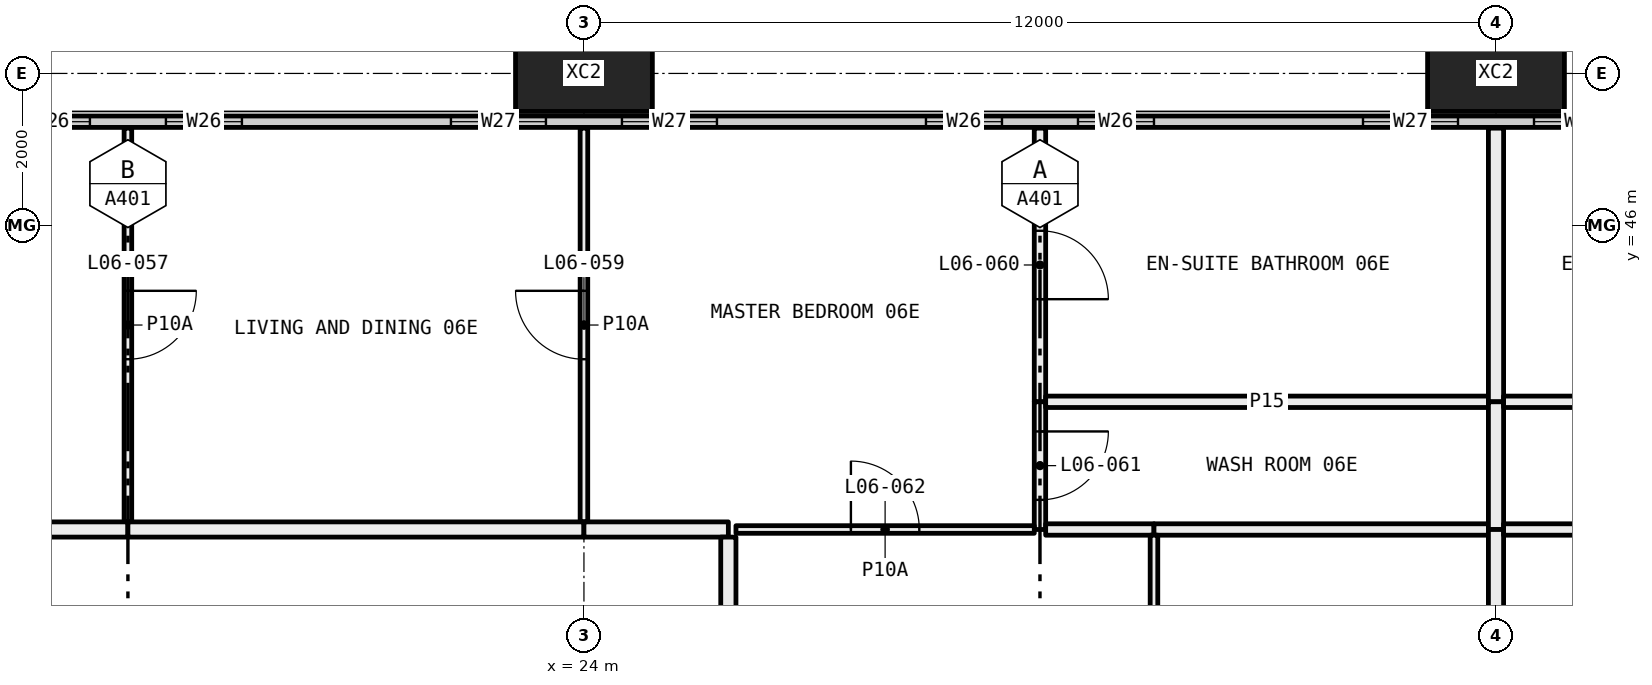
"""IFC4 building model, lengths in metres.
Left out: names, types, materials, properties, quantities, classifications, styles, units other than length and angle.
Written with IfcOpenShell. Run it as: python <this file> out.ifc"""

import sys

from ifc_helpers import new_model, si_unit, direction, frame, frame_2d, origin, origin_2d, place, context, subcontext, project, spatial, rectangle, hollow_rectangle, extrude, element, fill, save


model = new_model("IFC4")
c1 = context("Model", 3, precision=1e-05, world=origin(), true_north=direction((0.0, 1.0)))
c2 = subcontext(c1, "Body", "Model", "MODEL_VIEW")
j1 = project(units=[si_unit("LENGTHUNIT", "METRE"), si_unit("PLANEANGLEUNIT", "RADIAN")], contexts=[c1])
p1 = place(None, origin())
s1 = spatial("IfcSite", under=j1, at=p1, CompositionType="ELEMENT")
p2 = place(p1, origin())
s2 = spatial("IfcBuilding", under=s1, at=p2, CompositionType="ELEMENT")
p3 = place(p2, frame((0.0, 0.0, 33.45)))
s3 = spatial("IfcBuildingStorey", under=s2, at=p3, CompositionType="ELEMENT", Elevation=33.45)
for number, where, z_axis, x_axis in (
    (1, (24.0, 48.0, -0.4), (0.0, 0.0, 1.0), (1.0, 0.0, 0.0)),
    (2, (36.0, 48.0, -0.4), (0.0, 0.0, 1.0), (1.0, 0.0, 0.0)),
):
    element("IfcColumn", number, at=place(p3, frame(where, z_axis=z_axis, x_axis=x_axis)), inside=s3, PredefinedType="COLUMN", context=c2, shape_type="SweptSolid", body=[
        extrude(hollow_rectangle(XDim=1.8, YDim=1.0, WallThickness=0.07, at=origin_2d()), origin(), (0.0, 0.0, 1.0), 3.45),
    ])
p4 = place(p3, frame((6.56, 47.365, 0.0), z_axis=(0.0, 0.0, 1.0), x_axis=(1.0, 0.0, 0.0)))
e3 = element("IfcWall", 3, at=p4, inside=s3, PredefinedType="ELEMENTEDWALL", context=c2, shape_type="SweptSolid", body=[
    extrude(rectangle(XDim=58.88, YDim=0.15, at=frame_2d((29.44, 0.0))), origin(), (0.0, 0.0, 1.0), 3.05),
])
p5 = place(p4, frame((0.44, 0.0, 0.45)))
e4 = element("IfcOpeningElement", 4, at=p5, cuts=e3, PredefinedType="OPENING", context=c2, shape_type="SweptSolid", body=[
    extrude(rectangle(XDim=4.5, YDim=2.55, at=frame_2d((2.25, 1.275))), frame((0.0, 0.085, 0.0), z_axis=(0.0, -1.0, 0.0), x_axis=(1.0, 0.0, 0.0)), (0.0, 0.0, 1.0), 0.17),
])
p6 = place(p4, frame((5.94, 0.0, 0.45)))
e5 = element("IfcOpeningElement", 5, at=p6, cuts=e3, PredefinedType="OPENING", context=c2, shape_type="SweptSolid", body=[
    extrude(rectangle(XDim=1.25, YDim=2.55, at=frame_2d((0.625, 1.275))), frame((0.0, 0.085, 0.0), z_axis=(0.0, -1.0, 0.0), x_axis=(1.0, 0.0, 0.0)), (0.0, 0.0, 1.0), 0.17),
])
p7 = place(p4, frame((9.94, 0.0, 0.45)))
e6 = element("IfcOpeningElement", 6, at=p7, cuts=e3, PredefinedType="OPENING", context=c2, shape_type="SweptSolid", body=[
    extrude(rectangle(XDim=1.0, YDim=2.55, at=frame_2d((0.5, 1.275))), frame((0.0, 0.085, 0.0), z_axis=(0.0, -1.0, 0.0), x_axis=(1.0, 0.0, 0.0)), (0.0, 0.0, 1.0), 0.17),
])
p8 = place(p4, frame((11.94, 0.0, 0.45)))
e7 = element("IfcOpeningElement", 7, at=p8, cuts=e3, PredefinedType="OPENING", context=c2, shape_type="SweptSolid", body=[
    extrude(rectangle(XDim=1.0, YDim=2.55, at=frame_2d((0.5, 1.275))), frame((0.0, 0.085, 0.0), z_axis=(0.0, -1.0, 0.0), x_axis=(1.0, 0.0, 0.0)), (0.0, 0.0, 1.0), 0.17),
])
p9 = place(p4, frame((15.69, 0.0, 0.45)))
e8 = element("IfcOpeningElement", 8, at=p9, cuts=e3, PredefinedType="OPENING", context=c2, shape_type="SweptSolid", body=[
    extrude(rectangle(XDim=1.25, YDim=2.55, at=frame_2d((0.625, 1.275))), frame((0.0, 0.085, 0.0), z_axis=(0.0, -1.0, 0.0), x_axis=(1.0, 0.0, 0.0)), (0.0, 0.0, 1.0), 0.17),
])
p10 = place(p4, frame((17.94, 0.0, 0.45)))
e9 = element("IfcOpeningElement", 9, at=p10, cuts=e3, PredefinedType="OPENING", context=c2, shape_type="SweptSolid", body=[
    extrude(rectangle(XDim=1.25, YDim=2.55, at=frame_2d((0.625, 1.275))), frame((0.0, 0.085, 0.0), z_axis=(0.0, -1.0, 0.0), x_axis=(1.0, 0.0, 0.0)), (0.0, 0.0, 1.0), 0.17),
])
p11 = place(p4, frame((21.94, 0.0, 0.45)))
e10 = element("IfcOpeningElement", 10, at=p11, cuts=e3, PredefinedType="OPENING", context=c2, shape_type="SweptSolid", body=[
    extrude(rectangle(XDim=1.0, YDim=2.55, at=frame_2d((0.5, 1.275))), frame((0.0, 0.085, 0.0), z_axis=(0.0, -1.0, 0.0), x_axis=(1.0, 0.0, 0.0)), (0.0, 0.0, 1.0), 0.17),
])
p12 = place(p4, frame((23.94, 0.0, 0.45)))
e11 = element("IfcOpeningElement", 11, at=p12, cuts=e3, PredefinedType="OPENING", context=c2, shape_type="SweptSolid", body=[
    extrude(rectangle(XDim=1.0, YDim=2.55, at=frame_2d((0.5, 1.275))), frame((0.0, 0.085, 0.0), z_axis=(0.0, -1.0, 0.0), x_axis=(1.0, 0.0, 0.0)), (0.0, 0.0, 1.0), 0.17),
])
p13 = place(p4, frame((27.69, 0.0, 0.45)))
e12 = element("IfcOpeningElement", 12, at=p13, cuts=e3, PredefinedType="OPENING", context=c2, shape_type="SweptSolid", body=[
    extrude(rectangle(XDim=1.25, YDim=2.55, at=frame_2d((0.625, 1.275))), frame((0.0, 0.085, 0.0), z_axis=(0.0, -1.0, 0.0), x_axis=(1.0, 0.0, 0.0)), (0.0, 0.0, 1.0), 0.17),
])
p14 = place(p4, frame((29.94, 0.0, 0.45)))
e13 = element("IfcOpeningElement", 13, at=p14, cuts=e3, PredefinedType="OPENING", context=c2, shape_type="SweptSolid", body=[
    extrude(rectangle(XDim=1.25, YDim=2.55, at=frame_2d((0.625, 1.275))), frame((0.0, 0.085, 0.0), z_axis=(0.0, -1.0, 0.0), x_axis=(1.0, 0.0, 0.0)), (0.0, 0.0, 1.0), 0.17),
])
p15 = place(p4, frame((33.94, 0.0, 0.45)))
e14 = element("IfcOpeningElement", 14, at=p15, cuts=e3, PredefinedType="OPENING", context=c2, shape_type="SweptSolid", body=[
    extrude(rectangle(XDim=1.0, YDim=2.55, at=frame_2d((0.5, 1.275))), frame((0.0, 0.085, 0.0), z_axis=(0.0, -1.0, 0.0), x_axis=(1.0, 0.0, 0.0)), (0.0, 0.0, 1.0), 0.17),
])
p16 = place(p4, frame((35.94, 0.0, 0.45)))
e15 = element("IfcOpeningElement", 15, at=p16, cuts=e3, PredefinedType="OPENING", context=c2, shape_type="SweptSolid", body=[
    extrude(rectangle(XDim=1.0, YDim=2.55, at=frame_2d((0.5, 1.275))), frame((0.0, 0.085, 0.0), z_axis=(0.0, -1.0, 0.0), x_axis=(1.0, 0.0, 0.0)), (0.0, 0.0, 1.0), 0.17),
])
p17 = place(p4, frame((39.69, 0.0, 0.45)))
e16 = element("IfcOpeningElement", 16, at=p17, cuts=e3, PredefinedType="OPENING", context=c2, shape_type="SweptSolid", body=[
    extrude(rectangle(XDim=1.25, YDim=2.55, at=frame_2d((0.625, 1.275))), frame((0.0, 0.085, 0.0), z_axis=(0.0, -1.0, 0.0), x_axis=(1.0, 0.0, 0.0)), (0.0, 0.0, 1.0), 0.17),
])
p18 = place(p4, frame((41.94, 0.0, 0.45)))
e17 = element("IfcOpeningElement", 17, at=p18, cuts=e3, PredefinedType="OPENING", context=c2, shape_type="SweptSolid", body=[
    extrude(rectangle(XDim=1.25, YDim=2.55, at=frame_2d((0.625, 1.275))), frame((0.0, 0.085, 0.0), z_axis=(0.0, -1.0, 0.0), x_axis=(1.0, 0.0, 0.0)), (0.0, 0.0, 1.0), 0.17),
])
p19 = place(p4, frame((45.94, 0.0, 0.45)))
e18 = element("IfcOpeningElement", 18, at=p19, cuts=e3, PredefinedType="OPENING", context=c2, shape_type="SweptSolid", body=[
    extrude(rectangle(XDim=1.0, YDim=2.55, at=frame_2d((0.5, 1.275))), frame((0.0, 0.085, 0.0), z_axis=(0.0, -1.0, 0.0), x_axis=(1.0, 0.0, 0.0)), (0.0, 0.0, 1.0), 0.17),
])
p20 = place(p4, frame((47.94, 0.0, 0.45)))
e19 = element("IfcOpeningElement", 19, at=p20, cuts=e3, PredefinedType="OPENING", context=c2, shape_type="SweptSolid", body=[
    extrude(rectangle(XDim=1.0, YDim=2.55, at=frame_2d((0.5, 1.275))), frame((0.0, 0.085, 0.0), z_axis=(0.0, -1.0, 0.0), x_axis=(1.0, 0.0, 0.0)), (0.0, 0.0, 1.0), 0.17),
])
p21 = place(p4, frame((51.69, 0.0, 0.45)))
e20 = element("IfcOpeningElement", 20, at=p21, cuts=e3, PredefinedType="OPENING", context=c2, shape_type="SweptSolid", body=[
    extrude(rectangle(XDim=1.25, YDim=2.55, at=frame_2d((0.625, 1.275))), frame((0.0, 0.085, 0.0), z_axis=(0.0, -1.0, 0.0), x_axis=(1.0, 0.0, 0.0)), (0.0, 0.0, 1.0), 0.17),
])
p22 = place(p4, frame((53.94, 0.0, 0.45)))
e21 = element("IfcOpeningElement", 21, at=p22, cuts=e3, PredefinedType="OPENING", context=c2, shape_type="SweptSolid", body=[
    extrude(rectangle(XDim=4.5, YDim=2.55, at=frame_2d((2.25, 1.275))), frame((0.0, 0.085, 0.0), z_axis=(0.0, -1.0, 0.0), x_axis=(1.0, 0.0, 0.0)), (0.0, 0.0, 1.0), 0.17),
])
p23 = place(p3, frame((18.0, 42.1, 0.0), z_axis=(0.0, 0.0, 1.0), x_axis=(0.0, 1.0, 0.0)))
e22 = element("IfcWall", 22, at=p23, inside=s3, PredefinedType="PARTITIONING", context=c2, shape_type="SweptSolid", body=[
    extrude(rectangle(XDim=5.18, YDim=0.1, at=frame_2d((2.59, 0.0))), origin(), (0.0, 0.0, 1.0), 3.05),
])
p24 = place(p23, frame((2.14, 0.0, 0.0)))
e23 = element("IfcOpeningElement", 23, at=p24, cuts=e22, PredefinedType="OPENING", context=c2, shape_type="SweptSolid", body=[
    extrude(rectangle(XDim=0.9, YDim=2.1, at=frame_2d((0.45, 1.05))), frame((0.0, 0.06, 0.0), z_axis=(0.0, -1.0, 0.0), x_axis=(1.0, 0.0, 0.0)), (0.0, 0.0, 1.0), 0.12),
])
p25 = place(p3, frame((12.0, 42.0, 0.0), z_axis=(0.0, 0.0, 1.0), x_axis=(1.0, 0.0, 0.0)))
e24 = element("IfcWall", 24, at=p25, inside=s3, PredefinedType="PARTITIONING", context=c2, shape_type="SweptSolid", body=[
    extrude(rectangle(XDim=6.0, YDim=0.2, at=frame_2d((3.0, 0.0))), origin(), (0.0, 0.0, 1.0), 3.05),
])
p26 = place(p25, frame((2.5, 0.0, 0.0)))
e25 = element("IfcOpeningElement", 25, at=p26, cuts=e24, PredefinedType="OPENING", context=c2, shape_type="SweptSolid", body=[
    extrude(rectangle(XDim=1.0, YDim=2.1, at=frame_2d((0.5, 1.05))), frame((0.0, 0.11, 0.0), z_axis=(0.0, -1.0, 0.0), x_axis=(1.0, 0.0, 0.0)), (0.0, 0.0, 1.0), 0.22),
])
p27 = place(p3, frame((24.0, 42.1, 0.0), z_axis=(0.0, 0.0, 1.0), x_axis=(0.0, 1.0, 0.0)))
e26 = element("IfcWall", 26, at=p27, inside=s3, PredefinedType="PARTITIONING", context=c2, shape_type="SweptSolid", body=[
    extrude(rectangle(XDim=5.18, YDim=0.1, at=frame_2d((2.59, 0.0))), origin(), (0.0, 0.0, 1.0), 3.05),
])
p28 = place(p27, frame((2.14, 0.0, 0.0)))
e27 = element("IfcOpeningElement", 27, at=p28, cuts=e26, PredefinedType="OPENING", context=c2, shape_type="SweptSolid", body=[
    extrude(rectangle(XDim=0.9, YDim=2.1, at=frame_2d((0.45, 1.05))), frame((0.0, 0.06, 0.0), z_axis=(0.0, -1.0, 0.0), x_axis=(1.0, 0.0, 0.0)), (0.0, 0.0, 1.0), 0.12),
])
p29 = place(p3, frame((18.0, 42.0, 0.0), z_axis=(0.0, 0.0, 1.0), x_axis=(1.0, 0.0, 0.0)))
e28 = element("IfcWall", 28, at=p29, inside=s3, PredefinedType="PARTITIONING", context=c2, shape_type="SweptSolid", body=[
    extrude(rectangle(XDim=6.0, YDim=0.2, at=frame_2d((3.0, 0.0))), origin(), (0.0, 0.0, 1.0), 3.05),
])
p30 = place(p3, frame((30.0, 43.68, 0.0), z_axis=(0.0, 0.0, 1.0), x_axis=(0.0, 1.0, 0.0)))
e29 = element("IfcWall", 29, at=p30, inside=s3, PredefinedType="PARTITIONING", context=c2, shape_type="SweptSolid", body=[
    extrude(rectangle(XDim=3.6, YDim=0.15, at=frame_2d((1.8, 0.0))), origin(), (0.0, 0.0, 1.0), 3.05),
])
p31 = place(p30, frame((1.35, 0.0, 0.0)))
e30 = element("IfcOpeningElement", 30, at=p31, cuts=e29, PredefinedType="OPENING", context=c2, shape_type="SweptSolid", body=[
    extrude(rectangle(XDim=0.9, YDim=2.1, at=frame_2d((0.45, 1.05))), frame((0.0, 0.085, 0.0), z_axis=(0.0, -1.0, 0.0), x_axis=(1.0, 0.0, 0.0)), (0.0, 0.0, 1.0), 0.17),
])
p32 = place(p3, frame((30.0, 42.0, 0.0), z_axis=(0.0, 0.0, 1.0), x_axis=(0.0, 1.0, 0.0)))
e31 = element("IfcWall", 31, at=p32, inside=s3, PredefinedType="PARTITIONING", context=c2, shape_type="SweptSolid", body=[
    extrude(rectangle(XDim=1.68, YDim=0.15, at=frame_2d((0.84, 0.0))), origin(), (0.0, 0.0, 1.0), 3.05),
])
p33 = place(p32, frame((0.39, 0.0, 0.0)))
e32 = element("IfcOpeningElement", 32, at=p33, cuts=e31, PredefinedType="OPENING", context=c2, shape_type="SweptSolid", body=[
    extrude(rectangle(XDim=0.9, YDim=2.1, at=frame_2d((0.45, 1.05))), frame((0.0, 0.085, 0.0), z_axis=(0.0, -1.0, 0.0), x_axis=(1.0, 0.0, 0.0)), (0.0, 0.0, 1.0), 0.17),
])
p34 = place(p3, frame((26.0, 42.0, 0.0), z_axis=(0.0, 0.0, 1.0), x_axis=(1.0, 0.0, 0.0)))
e33 = element("IfcWall", 33, at=p34, inside=s3, PredefinedType="PARTITIONING", context=c2, shape_type="SweptSolid", body=[
    extrude(rectangle(XDim=3.925, YDim=0.1, at=frame_2d((1.962, 0.0))), origin(), (0.0, 0.0, 1.0), 3.05),
])
p35 = place(p34, frame((1.512, 0.0, 0.0)))
e34 = element("IfcOpeningElement", 34, at=p35, cuts=e33, PredefinedType="OPENING", context=c2, shape_type="SweptSolid", body=[
    extrude(rectangle(XDim=0.9, YDim=2.1, at=frame_2d((0.45, 1.05))), frame((0.0, 0.06, 0.0), z_axis=(0.0, -1.0, 0.0), x_axis=(1.0, 0.0, 0.0)), (0.0, 0.0, 1.0), 0.12),
])
p36 = place(p3, frame((24.0, 42.0, 0.0), z_axis=(0.0, 0.0, 1.0), x_axis=(1.0, 0.0, 0.0)))
e35 = element("IfcWall", 35, at=p36, inside=s3, PredefinedType="PARTITIONING", context=c2, shape_type="SweptSolid", body=[
    extrude(rectangle(XDim=1.9, YDim=0.2, at=frame_2d((0.95, 0.0))), origin(), (0.0, 0.0, 1.0), 3.05),
])
p37 = place(p3, frame((30.075, 43.68, 0.0), z_axis=(0.0, 0.0, 1.0), x_axis=(1.0, 0.0, 0.0)))
e36 = element("IfcWall", 36, at=p37, inside=s3, PredefinedType="PARTITIONING", context=c2, shape_type="SweptSolid", body=[
    extrude(rectangle(XDim=5.825, YDim=0.15, at=frame_2d((2.913, 0.0))), origin(), (0.0, 0.0, 1.0), 3.05),
])
p38 = place(p3, frame((36.0, 43.68, 0.0), z_axis=(0.0, 0.0, 1.0), x_axis=(0.0, 1.0, 0.0)))
e37 = element("IfcWall", 37, at=p38, inside=s3, PredefinedType="PARTITIONING", context=c2, shape_type="SweptSolid", body=[
    extrude(rectangle(XDim=3.6, YDim=0.2, at=frame_2d((1.8, 0.0))), origin(), (0.0, 0.0, 1.0), 2.45),
])
p39 = place(p3, frame((30.075, 42.0, 0.0), z_axis=(0.0, 0.0, 1.0), x_axis=(1.0, 0.0, 0.0)))
e38 = element("IfcWall", 38, at=p39, inside=s3, PredefinedType="PARTITIONING", context=c2, shape_type="SweptSolid", body=[
    extrude(rectangle(XDim=1.425, YDim=0.15, at=frame_2d((0.712, 0.0))), origin(), (0.0, 0.0, 1.0), 3.05),
])
p40 = place(p3, frame((31.5, 42.0, 0.0), z_axis=(0.0, 0.0, 1.0), x_axis=(1.0, 0.0, 0.0)))
e39 = element("IfcWall", 39, at=p40, inside=s3, PredefinedType="PARTITIONING", context=c2, shape_type="SweptSolid", body=[
    extrude(rectangle(XDim=4.4, YDim=0.15, at=frame_2d((2.2, 0.0))), origin(), (0.0, 0.0, 1.0), 3.05),
])
p41 = place(p3, frame((36.0, 42.0, 0.0), z_axis=(0.0, 0.0, 1.0), x_axis=(0.0, 1.0, 0.0)))
e40 = element("IfcWall", 40, at=p41, inside=s3, PredefinedType="PARTITIONING", context=c2, shape_type="SweptSolid", body=[
    extrude(rectangle(XDim=1.68, YDim=0.2, at=frame_2d((0.84, 0.0))), origin(), (0.0, 0.0, 1.0), 2.45),
])
p42 = place(p3, frame((31.5, 36.1, 0.0), z_axis=(0.0, 0.0, 1.0), x_axis=(0.0, 1.0, 0.0)))
e41 = element("IfcWall", 41, at=p42, inside=s3, PredefinedType="PARTITIONING", context=c2, shape_type="SweptSolid", body=[
    extrude(rectangle(XDim=5.825, YDim=0.1, at=frame_2d((2.913, 0.0))), origin(), (0.0, 0.0, 1.0), 3.05),
])
p43 = place(p42, frame((2.462, 0.0, 0.0)))
e42 = element("IfcOpeningElement", 42, at=p43, cuts=e41, PredefinedType="OPENING", context=c2, shape_type="SweptSolid", body=[
    extrude(rectangle(XDim=0.9, YDim=2.1, at=frame_2d((0.45, 1.05))), frame((0.0, 0.06, 0.0), z_axis=(0.0, -1.0, 0.0), x_axis=(1.0, 0.0, 0.0)), (0.0, 0.0, 1.0), 0.12),
])
p44 = place(p3, frame((25.9, 41.9, 0.0), z_axis=(0.0, 0.0, 1.0), x_axis=(0.0, -1.0, 0.0)))
e43 = element("IfcWall", 43, at=p44, inside=s3, PredefinedType="PARTITIONING", context=c2, shape_type="SweptSolid", body=[
    extrude(rectangle(XDim=6.2, YDim=0.2, at=frame_2d((3.1, 0.0))), origin(), (0.0, 0.0, 1.0), 2.45),
])
p45 = place(p3, frame((36.0, 36.8, 0.0), z_axis=(0.0, 0.0, 1.0), x_axis=(0.0, 1.0, 0.0)))
e44 = element("IfcWall", 44, at=p45, inside=s3, PredefinedType="PARTITIONING", context=c2, shape_type="SweptSolid", body=[
    extrude(rectangle(XDim=5.2, YDim=0.2, at=frame_2d((2.6, 0.0))), origin(), (0.0, 0.0, 1.0), 2.45),
])
p46 = place(p3, frame((36.1, 43.68, 0.0), z_axis=(0.0, 0.0, 1.0), x_axis=(1.0, 0.0, 0.0)))
e45 = element("IfcWall", 45, at=p46, inside=s3, PredefinedType="PARTITIONING", context=c2, shape_type="SweptSolid", body=[
    extrude(rectangle(XDim=5.9, YDim=0.15, at=frame_2d((2.95, 0.0))), origin(), (0.0, 0.0, 1.0), 3.05),
])
p47 = place(p3, frame((36.1, 42.0, 0.0), z_axis=(0.0, 0.0, 1.0), x_axis=(1.0, 0.0, 0.0)))
e46 = element("IfcWall", 46, at=p47, inside=s3, PredefinedType="PARTITIONING", context=c2, shape_type="SweptSolid", body=[
    extrude(rectangle(XDim=4.4, YDim=0.15, at=frame_2d((2.2, 0.0))), origin(), (0.0, 0.0, 1.0), 3.05),
])
p48 = place(p7, origin())
e47 = element("IfcWindow", 47, at=p48, inside=s3, PartitioningType="SINGLE_PANEL", PredefinedType="WINDOW", context=c2, shape_type="SweptSolid", body=[
    extrude(rectangle(XDim=1.0, YDim=2.55, at=frame_2d((0.5, 1.275))), frame((0.0, 0.03, 0.0), z_axis=(0.0, -1.0, 0.0), x_axis=(1.0, 0.0, 0.0)), (0.0, 0.0, 1.0), 0.06),
])
fill(e6, e47)
p49 = place(p8, origin())
e48 = element("IfcWindow", 48, at=p49, inside=s3, PartitioningType="SINGLE_PANEL", PredefinedType="WINDOW", context=c2, shape_type="SweptSolid", body=[
    extrude(rectangle(XDim=1.0, YDim=2.55, at=frame_2d((0.5, 1.275))), frame((0.0, 0.03, 0.0), z_axis=(0.0, -1.0, 0.0), x_axis=(1.0, 0.0, 0.0)), (0.0, 0.0, 1.0), 0.06),
])
fill(e7, e48)
p50 = place(p9, origin())
e49 = element("IfcWindow", 49, at=p50, inside=s3, PartitioningType="SINGLE_PANEL", PredefinedType="WINDOW", context=c2, shape_type="SweptSolid", body=[
    extrude(rectangle(XDim=1.25, YDim=2.55, at=frame_2d((0.625, 1.275))), frame((0.0, 0.03, 0.0), z_axis=(0.0, -1.0, 0.0), x_axis=(1.0, 0.0, 0.0)), (0.0, 0.0, 1.0), 0.06),
])
fill(e8, e49)
p51 = place(p10, origin())
e50 = element("IfcWindow", 50, at=p51, inside=s3, PartitioningType="SINGLE_PANEL", PredefinedType="WINDOW", context=c2, shape_type="SweptSolid", body=[
    extrude(rectangle(XDim=1.25, YDim=2.55, at=frame_2d((0.625, 1.275))), frame((0.0, 0.03, 0.0), z_axis=(0.0, -1.0, 0.0), x_axis=(1.0, 0.0, 0.0)), (0.0, 0.0, 1.0), 0.06),
])
fill(e9, e50)
p52 = place(p11, origin())
e51 = element("IfcWindow", 51, at=p52, inside=s3, PartitioningType="SINGLE_PANEL", PredefinedType="WINDOW", context=c2, shape_type="SweptSolid", body=[
    extrude(rectangle(XDim=1.0, YDim=2.55, at=frame_2d((0.5, 1.275))), frame((0.0, 0.03, 0.0), z_axis=(0.0, -1.0, 0.0), x_axis=(1.0, 0.0, 0.0)), (0.0, 0.0, 1.0), 0.06),
])
fill(e10, e51)
p53 = place(p12, origin())
e52 = element("IfcWindow", 52, at=p53, inside=s3, PartitioningType="SINGLE_PANEL", PredefinedType="WINDOW", context=c2, shape_type="SweptSolid", body=[
    extrude(rectangle(XDim=1.0, YDim=2.55, at=frame_2d((0.5, 1.275))), frame((0.0, 0.03, 0.0), z_axis=(0.0, -1.0, 0.0), x_axis=(1.0, 0.0, 0.0)), (0.0, 0.0, 1.0), 0.06),
])
fill(e11, e52)
p54 = place(p13, origin())
e53 = element("IfcWindow", 53, at=p54, inside=s3, PartitioningType="SINGLE_PANEL", PredefinedType="WINDOW", context=c2, shape_type="SweptSolid", body=[
    extrude(rectangle(XDim=1.25, YDim=2.55, at=frame_2d((0.625, 1.275))), frame((0.0, 0.03, 0.0), z_axis=(0.0, -1.0, 0.0), x_axis=(1.0, 0.0, 0.0)), (0.0, 0.0, 1.0), 0.06),
])
fill(e12, e53)
p55 = place(p14, origin())
e54 = element("IfcWindow", 54, at=p55, inside=s3, PartitioningType="SINGLE_PANEL", PredefinedType="WINDOW", context=c2, shape_type="SweptSolid", body=[
    extrude(rectangle(XDim=1.25, YDim=2.55, at=frame_2d((0.625, 1.275))), frame((0.0, 0.03, 0.0), z_axis=(0.0, -1.0, 0.0), x_axis=(1.0, 0.0, 0.0)), (0.0, 0.0, 1.0), 0.06),
])
fill(e13, e54)
p56 = place(p24, frame((0.9, 0.0, 0.0), x_axis=(-1.0, 0.0, 0.0)))
e55 = element("IfcDoor", 55, at=p56, inside=s3, OperationType="SINGLE_SWING_RIGHT", PredefinedType="DOOR", context=c2, shape_type="SweptSolid", body=[
    extrude(rectangle(XDim=0.9, YDim=2.1, at=frame_2d((0.45, 1.05))), frame((0.0, 0.025, 0.0), z_axis=(0.0, -1.0, 0.0), x_axis=(1.0, 0.0, 0.0)), (0.0, 0.0, 1.0), 0.05),
])
fill(e23, e55)
p57 = place(p28, origin())
e56 = element("IfcDoor", 56, at=p57, inside=s3, OperationType="SINGLE_SWING_LEFT", PredefinedType="DOOR", context=c2, shape_type="SweptSolid", body=[
    extrude(rectangle(XDim=0.9, YDim=2.1, at=frame_2d((0.45, 1.05))), frame((0.0, 0.025, 0.0), z_axis=(0.0, -1.0, 0.0), x_axis=(1.0, 0.0, 0.0)), (0.0, 0.0, 1.0), 0.05),
])
fill(e27, e56)
p58 = place(p31, frame((0.9, 0.0, 0.0), x_axis=(-1.0, 0.0, 0.0)))
e57 = element("IfcDoor", 57, at=p58, inside=s3, OperationType="SINGLE_SWING_LEFT", PredefinedType="DOOR", context=c2, shape_type="SweptSolid", body=[
    extrude(rectangle(XDim=0.9, YDim=2.1, at=frame_2d((0.45, 1.05))), frame((0.0, 0.025, 0.0), z_axis=(0.0, -1.0, 0.0), x_axis=(1.0, 0.0, 0.0)), (0.0, 0.0, 1.0), 0.05),
])
fill(e30, e57)
p59 = place(p33, frame((0.9, 0.0, 0.0), x_axis=(-1.0, 0.0, 0.0)))
e58 = element("IfcDoor", 58, at=p59, inside=s3, OperationType="SINGLE_SWING_RIGHT", PredefinedType="DOOR", context=c2, shape_type="SweptSolid", body=[
    extrude(rectangle(XDim=0.9, YDim=2.1, at=frame_2d((0.45, 1.05))), frame((0.0, 0.025, 0.0), z_axis=(0.0, -1.0, 0.0), x_axis=(1.0, 0.0, 0.0)), (0.0, 0.0, 1.0), 0.05),
])
fill(e32, e58)
p60 = place(p35, origin())
e59 = element("IfcDoor", 59, at=p60, inside=s3, OperationType="SINGLE_SWING_RIGHT", PredefinedType="DOOR", context=c2, shape_type="SweptSolid", body=[
    extrude(rectangle(XDim=0.9, YDim=2.1, at=frame_2d((0.45, 1.05))), frame((0.0, 0.025, 0.0), z_axis=(0.0, -1.0, 0.0), x_axis=(1.0, 0.0, 0.0)), (0.0, 0.0, 1.0), 0.05),
])
fill(e34, e59)
save(model, sys.argv[1])
